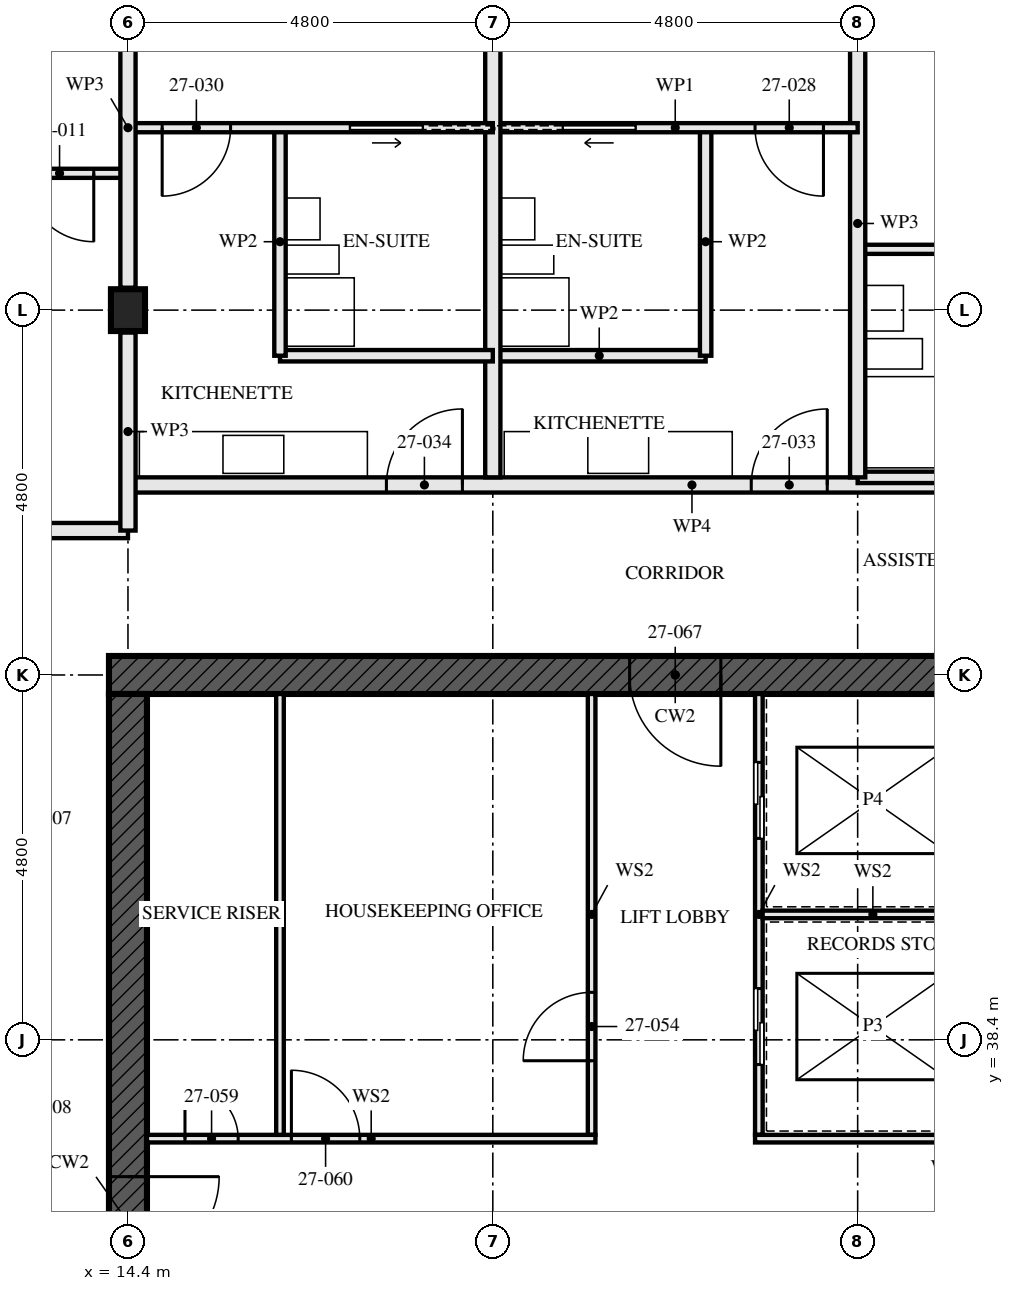
"""IFC4 building model, lengths in metres.
Left out: names, types, materials, properties, quantities, classifications, styles, units other than length and angle.
Written with IfcOpenShell. Run it as: python <this file> out.ifc"""

import sys

from ifc_helpers import new_model, si_unit, direction, frame, frame_2d, origin, origin_2d, place, context, subcontext, project, spatial, rectangle, i_section, extrude, element, fill, save


model = new_model("IFC4")
c1 = context("Model", 3, precision=1e-05, world=origin(), true_north=direction((0.0, 1.0)))
c2 = subcontext(c1, "Body", "Model", "MODEL_VIEW")
j1 = project(units=[si_unit("LENGTHUNIT", "METRE"), si_unit("PLANEANGLEUNIT", "RADIAN")], contexts=[c1])
p1 = place(None, origin())
s1 = spatial("IfcSite", under=j1, at=p1, CompositionType="ELEMENT")
p2 = place(p1, origin())
s2 = spatial("IfcBuilding", under=s1, at=p2, CompositionType="ELEMENT")
p3 = place(p2, frame((0.0, 0.0, 101.5)))
s3 = spatial("IfcBuildingStorey", under=s2, at=p3, CompositionType="ELEMENT", Elevation=101.5)
p4 = place(p3, frame((14.4, 48.0, 0.0), z_axis=(0.0, 0.0, 1.0), x_axis=(1.0, 0.0, 0.0)))
e1 = element("IfcColumn", 1, at=p4, inside=s3, PredefinedType="COLUMN", context=c2, shape_type="SweptSolid", body=[
    extrude(i_section(OverallWidth=0.448, OverallDepth=0.55, WebThickness=0.072, FlangeThickness=0.115, FilletRadius=0.015, at=origin_2d()), origin(), (0.0, 0.0, 1.0), 3.5),
])
p5 = place(p3, frame((29.05, 43.2, -0.17), z_axis=(0.0, 0.0, 1.0), x_axis=(-1.0, 0.0, 0.0)))
e2 = element("IfcWall", 2, at=p5, inside=s3, PredefinedType="SHEAR", context=c2, shape_type="SweptSolid", body=[
    extrude(rectangle(XDim=14.9, YDim=0.5, at=frame_2d((7.45, 0.0))), origin(), (0.0, 0.0, 1.0), 3.5),
])
p6 = place(p5, frame((6.85, 0.0, 0.17)))
e3 = element("IfcOpeningElement", 3, at=p6, cuts=e2, PredefinedType="OPENING", context=c2, shape_type="SweptSolid", body=[
    extrude(rectangle(XDim=1.2, YDim=2.1, at=frame_2d((0.6, 1.05))), frame((0.0, 0.26, 0.0), z_axis=(0.0, -1.0, 0.0), x_axis=(1.0, 0.0, 0.0)), (0.0, 0.0, 1.0), 0.521),
])
p7 = place(p3, frame((14.4, 42.95, -0.17), z_axis=(0.0, 0.0, 1.0), x_axis=(0.0, -1.0, 0.0)))
e4 = element("IfcWall", 4, at=p7, inside=s3, PredefinedType="SHEAR", context=c2, shape_type="SweptSolid", body=[
    extrude(rectangle(XDim=13.9, YDim=0.5, at=frame_2d((6.95, 0.0))), origin(), (0.0, 0.0, 1.0), 3.5),
])
p8 = place(p7, frame((6.35, 0.0, 0.17)))
e5 = element("IfcOpeningElement", 5, at=p8, cuts=e4, PredefinedType="OPENING", context=c2, shape_type="SweptSolid", body=[
    extrude(rectangle(XDim=1.2, YDim=2.1, at=frame_2d((0.6, 1.05))), frame((0.0, 0.26, 0.0), z_axis=(0.0, -1.0, 0.0), x_axis=(1.0, 0.0, 0.0)), (0.0, 0.0, 1.0), 0.521),
])
p9 = place(p3, frame((14.4, 49.8, 0.0), z_axis=(0.0, 0.0, 1.0), x_axis=(-1.0, 0.0, 0.0)))
e6 = element("IfcWall", 6, at=p9, inside=s3, PredefinedType="PARTITIONING", context=c2, shape_type="SweptSolid", body=[
    extrude(rectangle(XDim=4.8, YDim=0.12, at=frame_2d((2.4, 0.0))), origin(), (0.0, 0.0, 1.0), 3.33),
])
p10 = place(p9, frame((0.45, 0.0, 0.0)))
e7 = element("IfcOpeningElement", 7, at=p10, cuts=e6, PredefinedType="OPENING", context=c2, shape_type="SweptSolid", body=[
    extrude(rectangle(XDim=0.9, YDim=2.1, at=frame_2d((0.45, 1.05))), frame((0.0, 0.071, 0.0), z_axis=(0.0, -1.0, 0.0), x_axis=(1.0, 0.0, 0.0)), (0.0, 0.0, 1.0), 0.141),
])
p11 = place(p3, frame((14.4, 45.1, 0.0), z_axis=(0.0, 0.0, 1.0), x_axis=(-1.0, 0.0, 0.0)))
e8 = element("IfcWall", 8, at=p11, inside=s3, PredefinedType="PARTITIONING", context=c2, shape_type="SweptSolid", body=[
    extrude(rectangle(XDim=9.6, YDim=0.2, at=frame_2d((4.8, 0.0))), origin(), (0.0, 0.0, 1.0), 3.33),
])
p12 = place(p11, frame((5.2, 0.0, 0.0)))
e9 = element("IfcOpeningElement", 9, at=p12, cuts=e8, PredefinedType="OPENING", context=c2, shape_type="SweptSolid", body=[
    extrude(rectangle(XDim=1.0, YDim=2.1, at=frame_2d((0.5, 1.05))), frame((0.0, 0.111, 0.0), z_axis=(0.0, -1.0, 0.0), x_axis=(1.0, 0.0, 0.0)), (0.0, 0.0, 1.0), 0.221),
])
p13 = place(p3, frame((26.8, 45.8, 0.0), z_axis=(0.0, 0.0, 1.0), x_axis=(-1.0, 0.0, 0.0)))
e10 = element("IfcWall", 10, at=p13, inside=s3, PredefinedType="PARTITIONING", context=c2, shape_type="SweptSolid", body=[
    extrude(rectangle(XDim=2.8, YDim=0.15, at=frame_2d((1.4, 0.0))), origin(), (0.0, 0.0, 1.0), 3.33),
])
p14 = place(p3, frame((29.24, 48.8, 0.0), z_axis=(0.0, 0.0, 1.0), x_axis=(-1.0, 0.0, 0.0)))
e11 = element("IfcWall", 11, at=p14, inside=s3, PredefinedType="PARTITIONING", context=c2, shape_type="SweptSolid", body=[
    extrude(rectangle(XDim=5.24, YDim=0.12, at=frame_2d((2.62, 0.0))), origin(), (0.0, 0.0, 1.0), 2.32),
])
p15 = place(p14, frame((1.365, 0.0, 0.0)))
e12 = element("IfcOpeningElement", 12, at=p15, cuts=e11, PredefinedType="OPENING", context=c2, shape_type="SweptSolid", body=[
    extrude(rectangle(XDim=0.9, YDim=2.1, at=frame_2d((0.45, 1.05))), frame((0.0, 0.071, 0.0), z_axis=(0.0, -1.0, 0.0), x_axis=(1.0, 0.0, 0.0)), (0.0, 0.0, 1.0), 0.141),
])
p16 = place(p3, frame((24.0, 52.48, 0.0), z_axis=(0.0, 0.0, 1.0), x_axis=(0.0, -1.0, 0.0)))
e13 = element("IfcWall", 13, at=p16, inside=s3, PredefinedType="PARTITIONING", context=c2, shape_type="SweptSolid", body=[
    extrude(rectangle(XDim=6.68, YDim=0.2, at=frame_2d((3.34, 0.0))), origin(), (0.0, 0.0, 1.0), 2.55),
])
p17 = place(p3, frame((22.0, 50.4, 0.0), z_axis=(0.0, 0.0, 1.0), x_axis=(0.0, -1.0, 0.0)))
e14 = element("IfcWall", 14, at=p17, inside=s3, PredefinedType="PARTITIONING", context=c2, shape_type="SweptSolid", body=[
    extrude(rectangle(XDim=3.0, YDim=0.15, at=frame_2d((1.5, 0.0))), origin(), (0.0, 0.0, 1.0), 2.55),
])
p18 = place(p3, frame((22.0, 47.4, 0.0), z_axis=(0.0, 0.0, 1.0), x_axis=(-1.0, 0.0, 0.0)))
e15 = element("IfcWall", 15, at=p18, inside=s3, PredefinedType="PARTITIONING", context=c2, shape_type="SweptSolid", body=[
    extrude(rectangle(XDim=2.8, YDim=0.15, at=frame_2d((1.4, 0.0))), origin(), (0.0, 0.0, 1.0), 3.33),
])
p19 = place(p3, frame((24.0, 50.4, 0.0), z_axis=(0.0, 0.0, 1.0), x_axis=(-1.0, 0.0, 0.0)))
e16 = element("IfcWall", 16, at=p19, inside=s3, PredefinedType="PARTITIONING", context=c2, shape_type="SweptSolid", body=[
    extrude(rectangle(XDim=4.8, YDim=0.12, at=frame_2d((2.4, 0.0))), origin(), (0.0, 0.0, 1.0), 3.33),
])
p20 = place(p19, frame((0.45, 0.0, 0.0)))
e17 = element("IfcOpeningElement", 17, at=p20, cuts=e16, PredefinedType="OPENING", context=c2, shape_type="SweptSolid", body=[
    extrude(rectangle(XDim=0.9, YDim=2.1, at=frame_2d((0.45, 1.05))), frame((0.0, 0.071, 0.0), z_axis=(0.0, -1.0, 0.0), x_axis=(1.0, 0.0, 0.0)), (0.0, 0.0, 1.0), 0.141),
])
p21 = place(p19, frame((2.925, 0.0, 0.0)))
e18 = element("IfcOpeningElement", 18, at=p21, cuts=e16, PredefinedType="OPENING", context=c2, shape_type="SweptSolid", body=[
    extrude(rectangle(XDim=0.95, YDim=2.1, at=frame_2d((0.475, 1.05))), frame((0.0, 0.071, 0.0), z_axis=(0.0, -1.0, 0.0), x_axis=(1.0, 0.0, 0.0)), (0.0, 0.0, 1.0), 0.141),
])
p22 = place(p3, frame((19.2, 57.28, 0.0), z_axis=(0.0, 0.0, 1.0), x_axis=(0.0, -1.0, 0.0)))
e19 = element("IfcWall", 19, at=p22, inside=s3, PredefinedType="PARTITIONING", context=c2, shape_type="SweptSolid", body=[
    extrude(rectangle(XDim=11.48, YDim=0.2, at=frame_2d((5.74, 0.0))), origin(), (0.0, 0.0, 1.0), 2.55),
])
p23 = place(p3, frame((16.4, 50.4, 0.0), z_axis=(0.0, 0.0, 1.0), x_axis=(0.0, -1.0, 0.0)))
e20 = element("IfcWall", 20, at=p23, inside=s3, PredefinedType="PARTITIONING", context=c2, shape_type="SweptSolid", body=[
    extrude(rectangle(XDim=3.0, YDim=0.15, at=frame_2d((1.5, 0.0))), origin(), (0.0, 0.0, 1.0), 2.55),
])
p24 = place(p3, frame((19.2, 47.4, 0.0), z_axis=(0.0, 0.0, 1.0), x_axis=(-1.0, 0.0, 0.0)))
e21 = element("IfcWall", 21, at=p24, inside=s3, PredefinedType="PARTITIONING", context=c2, shape_type="SweptSolid", body=[
    extrude(rectangle(XDim=2.8, YDim=0.15, at=frame_2d((1.4, 0.0))), origin(), (0.0, 0.0, 1.0), 3.33),
])
p25 = place(p3, frame((19.2, 50.4, 0.0), z_axis=(0.0, 0.0, 1.0), x_axis=(-1.0, 0.0, 0.0)))
e22 = element("IfcWall", 22, at=p25, inside=s3, PredefinedType="PARTITIONING", context=c2, shape_type="SweptSolid", body=[
    extrude(rectangle(XDim=4.8, YDim=0.12, at=frame_2d((2.4, 0.0))), origin(), (0.0, 0.0, 1.0), 3.33),
])
p26 = place(p25, frame((3.45, 0.0, 0.0)))
e23 = element("IfcOpeningElement", 23, at=p26, cuts=e22, PredefinedType="OPENING", context=c2, shape_type="SweptSolid", body=[
    extrude(rectangle(XDim=0.9, YDim=2.1, at=frame_2d((0.45, 1.05))), frame((0.0, 0.071, 0.0), z_axis=(0.0, -1.0, 0.0), x_axis=(1.0, 0.0, 0.0)), (0.0, 0.0, 1.0), 0.141),
])
p27 = place(p25, frame((0.925, 0.0, 0.0)))
e24 = element("IfcOpeningElement", 24, at=p27, cuts=e22, PredefinedType="OPENING", context=c2, shape_type="SweptSolid", body=[
    extrude(rectangle(XDim=0.95, YDim=2.1, at=frame_2d((0.475, 1.05))), frame((0.0, 0.071, 0.0), z_axis=(0.0, -1.0, 0.0), x_axis=(1.0, 0.0, 0.0)), (0.0, 0.0, 1.0), 0.141),
])
p28 = place(p3, frame((29.24, 45.7, 0.0), z_axis=(0.0, 0.0, 1.0), x_axis=(-1.0, 0.0, 0.0)))
e25 = element("IfcWall", 25, at=p28, inside=s3, PredefinedType="PARTITIONING", context=c2, shape_type="SweptSolid", body=[
    extrude(rectangle(XDim=14.84, YDim=0.2, at=frame_2d((7.42, 0.0))), origin(), (0.0, 0.0, 1.0), 2.32),
])
p29 = place(p28, frame((0.84, 0.0, 0.0)))
e26 = element("IfcOpeningElement", 26, at=p29, cuts=e25, PredefinedType="OPENING", context=c2, shape_type="SweptSolid", body=[
    extrude(rectangle(XDim=1.0, YDim=2.1, at=frame_2d((0.5, 1.05))), frame((0.0, 0.111, 0.0), z_axis=(0.0, -1.0, 0.0), x_axis=(1.0, 0.0, 0.0)), (0.0, 0.0, 1.0), 0.221),
])
p30 = place(p28, frame((5.64, 0.0, 0.0)))
e27 = element("IfcOpeningElement", 27, at=p30, cuts=e25, PredefinedType="OPENING", context=c2, shape_type="SweptSolid", body=[
    extrude(rectangle(XDim=1.0, YDim=2.1, at=frame_2d((0.5, 1.05))), frame((0.0, 0.111, 0.0), z_axis=(0.0, -1.0, 0.0), x_axis=(1.0, 0.0, 0.0)), (0.0, 0.0, 1.0), 0.221),
])
p31 = place(p28, frame((10.44, 0.0, 0.0)))
e28 = element("IfcOpeningElement", 28, at=p31, cuts=e25, PredefinedType="OPENING", context=c2, shape_type="SweptSolid", body=[
    extrude(rectangle(XDim=1.0, YDim=2.1, at=frame_2d((0.5, 1.05))), frame((0.0, 0.111, 0.0), z_axis=(0.0, -1.0, 0.0), x_axis=(1.0, 0.0, 0.0)), (0.0, 0.0, 1.0), 0.221),
])
p32 = place(p3, frame((16.4, 37.15, 0.0), z_axis=(0.0, 0.0, 1.0), x_axis=(0.0, 1.0, 0.0)))
e29 = element("IfcWall", 29, at=p32, inside=s3, PredefinedType="SOLIDWALL", context=c2, shape_type="SweptSolid", body=[
    extrude(rectangle(XDim=5.8, YDim=0.1, at=frame_2d((2.9, 0.0))), origin(), (0.0, 0.0, 1.0), 3.33),
])
p33 = place(p3, frame((20.5, 37.15, 0.0), z_axis=(0.0, 0.0, 1.0), x_axis=(0.0, 1.0, 0.0)))
e30 = element("IfcWall", 30, at=p33, inside=s3, PredefinedType="SOLIDWALL", context=c2, shape_type="SweptSolid", body=[
    extrude(rectangle(XDim=5.8, YDim=0.1, at=frame_2d((2.9, 0.0))), origin(), (0.0, 0.0, 1.0), 3.33),
])
p34 = place(p33, frame((0.975, 0.0, 0.0)))
e31 = element("IfcOpeningElement", 31, at=p34, cuts=e30, PredefinedType="OPENING", context=c2, shape_type="SweptSolid", body=[
    extrude(rectangle(XDim=0.9, YDim=2.1, at=frame_2d((0.45, 1.05))), frame((0.0, 0.061, 0.0), z_axis=(0.0, -1.0, 0.0), x_axis=(1.0, 0.0, 0.0)), (0.0, 0.0, 1.0), 0.121),
])
p35 = place(p3, frame((22.7, 37.15, 0.0), z_axis=(0.0, 0.0, 1.0), x_axis=(0.0, 1.0, 0.0)))
e32 = element("IfcWall", 32, at=p35, inside=s3, PredefinedType="SOLIDWALL", context=c2, shape_type="SweptSolid", body=[
    extrude(rectangle(XDim=5.8, YDim=0.1, at=frame_2d((2.9, 0.0))), origin(), (0.0, 0.0, 1.0), 3.33),
])
p36 = place(p35, frame((0.925, 0.0, 0.0)))
e33 = element("IfcOpeningElement", 33, at=p36, cuts=e32, PredefinedType="OPENING", context=c2, shape_type="SweptSolid", body=[
    extrude(rectangle(XDim=1.0, YDim=2.1, at=frame_2d((0.5, 1.05))), frame((0.0, 0.061, 0.0), z_axis=(0.0, -1.0, 0.0), x_axis=(1.0, 0.0, 0.0)), (0.0, 0.0, 1.0), 0.121),
])
p37 = place(p35, frame((3.9, 0.0, 0.0)))
e34 = element("IfcOpeningElement", 34, at=p37, cuts=e32, PredefinedType="OPENING", context=c2, shape_type="SweptSolid", body=[
    extrude(rectangle(XDim=1.0, YDim=2.1, at=frame_2d((0.5, 1.05))), frame((0.0, 0.061, 0.0), z_axis=(0.0, -1.0, 0.0), x_axis=(1.0, 0.0, 0.0)), (0.0, 0.0, 1.0), 0.121),
])
p38 = place(p3, frame((14.65, 37.1, 0.0), z_axis=(0.0, 0.0, 1.0), x_axis=(1.0, 0.0, 0.0)))
e35 = element("IfcWall", 35, at=p38, inside=s3, PredefinedType="SOLIDWALL", context=c2, shape_type="SweptSolid", body=[
    extrude(rectangle(XDim=5.9, YDim=0.1, at=frame_2d((2.95, 0.0))), origin(), (0.0, 0.0, 1.0), 3.33),
])
p39 = place(p38, frame((0.5, 0.0, 0.0)))
e36 = element("IfcOpeningElement", 36, at=p39, cuts=e35, PredefinedType="OPENING", context=c2, shape_type="SweptSolid", body=[
    extrude(rectangle(XDim=0.7, YDim=2.1, at=frame_2d((0.35, 1.05))), frame((0.0, 0.061, 0.0), z_axis=(0.0, -1.0, 0.0), x_axis=(1.0, 0.0, 0.0)), (0.0, 0.0, 1.0), 0.121),
])
p40 = place(p38, frame((1.9, 0.0, 0.0)))
e37 = element("IfcOpeningElement", 37, at=p40, cuts=e35, PredefinedType="OPENING", context=c2, shape_type="SweptSolid", body=[
    extrude(rectangle(XDim=0.9, YDim=2.1, at=frame_2d((0.45, 1.05))), frame((0.0, 0.061, 0.0), z_axis=(0.0, -1.0, 0.0), x_axis=(1.0, 0.0, 0.0)), (0.0, 0.0, 1.0), 0.121),
])
p41 = place(p3, frame((22.65, 37.1, 0.0), z_axis=(0.0, 0.0, 1.0), x_axis=(1.0, 0.0, 0.0)))
e38 = element("IfcWall", 38, at=p41, inside=s3, PredefinedType="SOLIDWALL", context=c2, shape_type="SweptSolid", body=[
    extrude(rectangle(XDim=5.9, YDim=0.1, at=frame_2d((2.95, 0.0))), origin(), (0.0, 0.0, 1.0), 3.33),
])
p42 = place(p41, frame((3.15, 0.0, 0.0)))
e39 = element("IfcOpeningElement", 39, at=p42, cuts=e38, PredefinedType="OPENING", context=c2, shape_type="SweptSolid", body=[
    extrude(rectangle(XDim=0.9, YDim=2.1, at=frame_2d((0.45, 1.05))), frame((0.0, 0.061, 0.0), z_axis=(0.0, -1.0, 0.0), x_axis=(1.0, 0.0, 0.0)), (0.0, 0.0, 1.0), 0.121),
])
p43 = place(p41, frame((4.7, 0.0, 0.0)))
e40 = element("IfcOpeningElement", 40, at=p43, cuts=e38, PredefinedType="OPENING", context=c2, shape_type="SweptSolid", body=[
    extrude(rectangle(XDim=0.7, YDim=2.1, at=frame_2d((0.35, 1.05))), frame((0.0, 0.061, 0.0), z_axis=(0.0, -1.0, 0.0), x_axis=(1.0, 0.0, 0.0)), (0.0, 0.0, 1.0), 0.121),
])
p44 = place(p3, frame((22.75, 40.05, 0.0), z_axis=(0.0, 0.0, 1.0), x_axis=(1.0, 0.0, 0.0)))
e41 = element("IfcWall", 41, at=p44, inside=s3, PredefinedType="SOLIDWALL", context=c2, shape_type="SweptSolid", body=[
    extrude(rectangle(XDim=2.9, YDim=0.1, at=frame_2d((1.45, 0.0))), origin(), (0.0, 0.0, 1.0), 3.33),
])
p45 = place(p3, frame((14.4, 45.1, 0.0), z_axis=(0.0, 0.0, 1.0), x_axis=(0.0, 1.0, 0.0)))
e42 = element("IfcWall", 42, at=p45, inside=s3, PredefinedType="PARTITIONING", context=c2, shape_type="SweptSolid", body=[
    extrude(rectangle(XDim=2.605, YDim=0.2, at=frame_2d((1.302, 0.0))), origin(), (0.0, 0.0, 1.0), 2.32),
])
p46 = place(p3, frame((14.4, 48.295, 0.0), z_axis=(0.0, 0.0, 1.0), x_axis=(0.0, 1.0, 0.0)))
e43 = element("IfcWall", 43, at=p46, inside=s3, PredefinedType="PARTITIONING", context=c2, shape_type="SweptSolid", body=[
    extrude(rectangle(XDim=4.21, YDim=0.2, at=frame_2d((2.105, 0.0))), origin(), (0.0, 0.0, 1.0), 2.32),
])
p47 = place(p10, origin())
e44 = element("IfcDoor", 44, at=p47, inside=s3, OperationType="SINGLE_SWING_RIGHT", PredefinedType="DOOR", context=c2, shape_type="SweptSolid", body=[
    extrude(rectangle(XDim=0.9, YDim=2.1, at=frame_2d((0.45, 1.05))), frame((0.0, 0.022, 0.0), z_axis=(0.0, -1.0, 0.0), x_axis=(1.0, 0.0, 0.0)), (0.0, 0.0, 1.0), 0.044),
])
fill(e7, e44)
p48 = place(p20, origin())
e45 = element("IfcDoor", 45, at=p48, inside=s3, OperationType="SINGLE_SWING_RIGHT", PredefinedType="DOOR", context=c2, shape_type="SweptSolid", body=[
    extrude(rectangle(XDim=0.9, YDim=2.1, at=frame_2d((0.45, 1.05))), frame((0.0, 0.022, 0.0), z_axis=(0.0, -1.0, 0.0), x_axis=(1.0, 0.0, 0.0)), (0.0, 0.0, 1.0), 0.044),
])
fill(e17, e45)
p49 = place(p21, origin())
e46 = element("IfcDoor", 46, at=p49, inside=s3, OperationType="SLIDING_TO_LEFT", PredefinedType="DOOR", context=c2, shape_type="SweptSolid", body=[
    extrude(rectangle(XDim=0.95, YDim=2.1, at=frame_2d((0.475, 1.05))), frame((0.0, 0.022, 0.0), z_axis=(0.0, -1.0, 0.0), x_axis=(1.0, 0.0, 0.0)), (0.0, 0.0, 1.0), 0.044),
])
fill(e18, e46)
p50 = place(p26, origin())
e47 = element("IfcDoor", 47, at=p50, inside=s3, OperationType="SINGLE_SWING_LEFT", PredefinedType="DOOR", context=c2, shape_type="SweptSolid", body=[
    extrude(rectangle(XDim=0.9, YDim=2.1, at=frame_2d((0.45, 1.05))), frame((0.0, 0.022, 0.0), z_axis=(0.0, -1.0, 0.0), x_axis=(1.0, 0.0, 0.0)), (0.0, 0.0, 1.0), 0.044),
])
fill(e23, e47)
p51 = place(p27, origin())
e48 = element("IfcDoor", 48, at=p51, inside=s3, OperationType="SLIDING_TO_RIGHT", PredefinedType="DOOR", context=c2, shape_type="SweptSolid", body=[
    extrude(rectangle(XDim=0.95, YDim=2.1, at=frame_2d((0.475, 1.05))), frame((0.0, 0.022, 0.0), z_axis=(0.0, -1.0, 0.0), x_axis=(1.0, 0.0, 0.0)), (0.0, 0.0, 1.0), 0.044),
])
fill(e24, e48)
p52 = place(p30, frame((1.0, 0.0, 0.0), z_axis=(0.0, 0.0, 1.0), x_axis=(-1.0, 0.0, 0.0)))
e49 = element("IfcDoor", 49, at=p52, inside=s3, OperationType="SINGLE_SWING_LEFT", PredefinedType="DOOR", context=c2, shape_type="SweptSolid", body=[
    extrude(rectangle(XDim=1.0, YDim=2.1, at=frame_2d((0.5, 1.05))), frame((0.0, 0.027, 0.0), z_axis=(0.0, -1.0, 0.0), x_axis=(1.0, 0.0, 0.0)), (0.0, 0.0, 1.0), 0.054),
])
fill(e27, e49)
p53 = place(p31, frame((1.0, 0.0, 0.0), z_axis=(0.0, 0.0, 1.0), x_axis=(-1.0, 0.0, 0.0)))
e50 = element("IfcDoor", 50, at=p53, inside=s3, OperationType="SINGLE_SWING_LEFT", PredefinedType="DOOR", context=c2, shape_type="SweptSolid", body=[
    extrude(rectangle(XDim=1.0, YDim=2.1, at=frame_2d((0.5, 1.05))), frame((0.0, 0.027, 0.0), z_axis=(0.0, -1.0, 0.0), x_axis=(1.0, 0.0, 0.0)), (0.0, 0.0, 1.0), 0.054),
])
fill(e28, e50)
p54 = place(p34, origin())
e51 = element("IfcDoor", 51, at=p54, inside=s3, OperationType="SINGLE_SWING_RIGHT", PredefinedType="DOOR", context=c2, shape_type="SweptSolid", body=[
    extrude(rectangle(XDim=0.9, YDim=2.1, at=frame_2d((0.45, 1.05))), frame((0.0, 0.027, 0.0), z_axis=(0.0, -1.0, 0.0), x_axis=(1.0, 0.0, 0.0)), (0.0, 0.0, 1.0), 0.054),
])
fill(e31, e51)
p55 = place(p36, origin())
e52 = element("IfcDoor", 52, at=p55, inside=s3, OperationType="SLIDING_TO_LEFT", PredefinedType="DOOR", context=c2, shape_type="SweptSolid", body=[
    extrude(rectangle(XDim=1.0, YDim=2.1, at=frame_2d((0.5, 1.05))), frame((0.0, 0.05, 0.0), z_axis=(0.0, -1.0, 0.0), x_axis=(1.0, 0.0, 0.0)), (0.0, 0.0, 1.0), 0.1),
])
fill(e33, e52)
p56 = place(p37, origin())
e53 = element("IfcDoor", 53, at=p56, inside=s3, OperationType="SLIDING_TO_LEFT", PredefinedType="DOOR", context=c2, shape_type="SweptSolid", body=[
    extrude(rectangle(XDim=1.0, YDim=2.1, at=frame_2d((0.5, 1.05))), frame((0.0, 0.05, 0.0), z_axis=(0.0, -1.0, 0.0), x_axis=(1.0, 0.0, 0.0)), (0.0, 0.0, 1.0), 0.1),
])
fill(e34, e53)
p57 = place(p39, origin())
e54 = element("IfcDoor", 54, at=p57, inside=s3, OperationType="SINGLE_SWING_RIGHT", PredefinedType="DOOR", context=c2, shape_type="SweptSolid", body=[
    extrude(rectangle(XDim=0.7, YDim=2.1, at=frame_2d((0.35, 1.05))), frame((0.0, 0.027, 0.0), z_axis=(0.0, -1.0, 0.0), x_axis=(1.0, 0.0, 0.0)), (0.0, 0.0, 1.0), 0.054),
])
fill(e36, e54)
p58 = place(p40, origin())
e55 = element("IfcDoor", 55, at=p58, inside=s3, OperationType="SINGLE_SWING_RIGHT", PredefinedType="DOOR", context=c2, shape_type="SweptSolid", body=[
    extrude(rectangle(XDim=0.9, YDim=2.1, at=frame_2d((0.45, 1.05))), frame((0.0, 0.027, 0.0), z_axis=(0.0, -1.0, 0.0), x_axis=(1.0, 0.0, 0.0)), (0.0, 0.0, 1.0), 0.054),
])
fill(e37, e55)
p59 = place(p8, origin())
e56 = element("IfcDoor", 56, at=p59, inside=s3, OperationType="SINGLE_SWING_LEFT", PredefinedType="DOOR", context=c2, shape_type="SweptSolid", body=[
    extrude(rectangle(XDim=1.2, YDim=2.1, at=frame_2d((0.6, 1.05))), frame((0.0, 0.027, 0.0), z_axis=(0.0, -1.0, 0.0), x_axis=(1.0, 0.0, 0.0)), (0.0, 0.0, 1.0), 0.054),
])
fill(e5, e56)
p60 = place(p6, origin())
e57 = element("IfcDoor", 57, at=p60, inside=s3, OperationType="SINGLE_SWING_LEFT", PredefinedType="DOOR", context=c2, shape_type="SweptSolid", body=[
    extrude(rectangle(XDim=1.2, YDim=2.1, at=frame_2d((0.6, 1.05))), frame((0.0, 0.027, 0.0), z_axis=(0.0, -1.0, 0.0), x_axis=(1.0, 0.0, 0.0)), (0.0, 0.0, 1.0), 0.054),
])
fill(e3, e57)
save(model, sys.argv[1])
